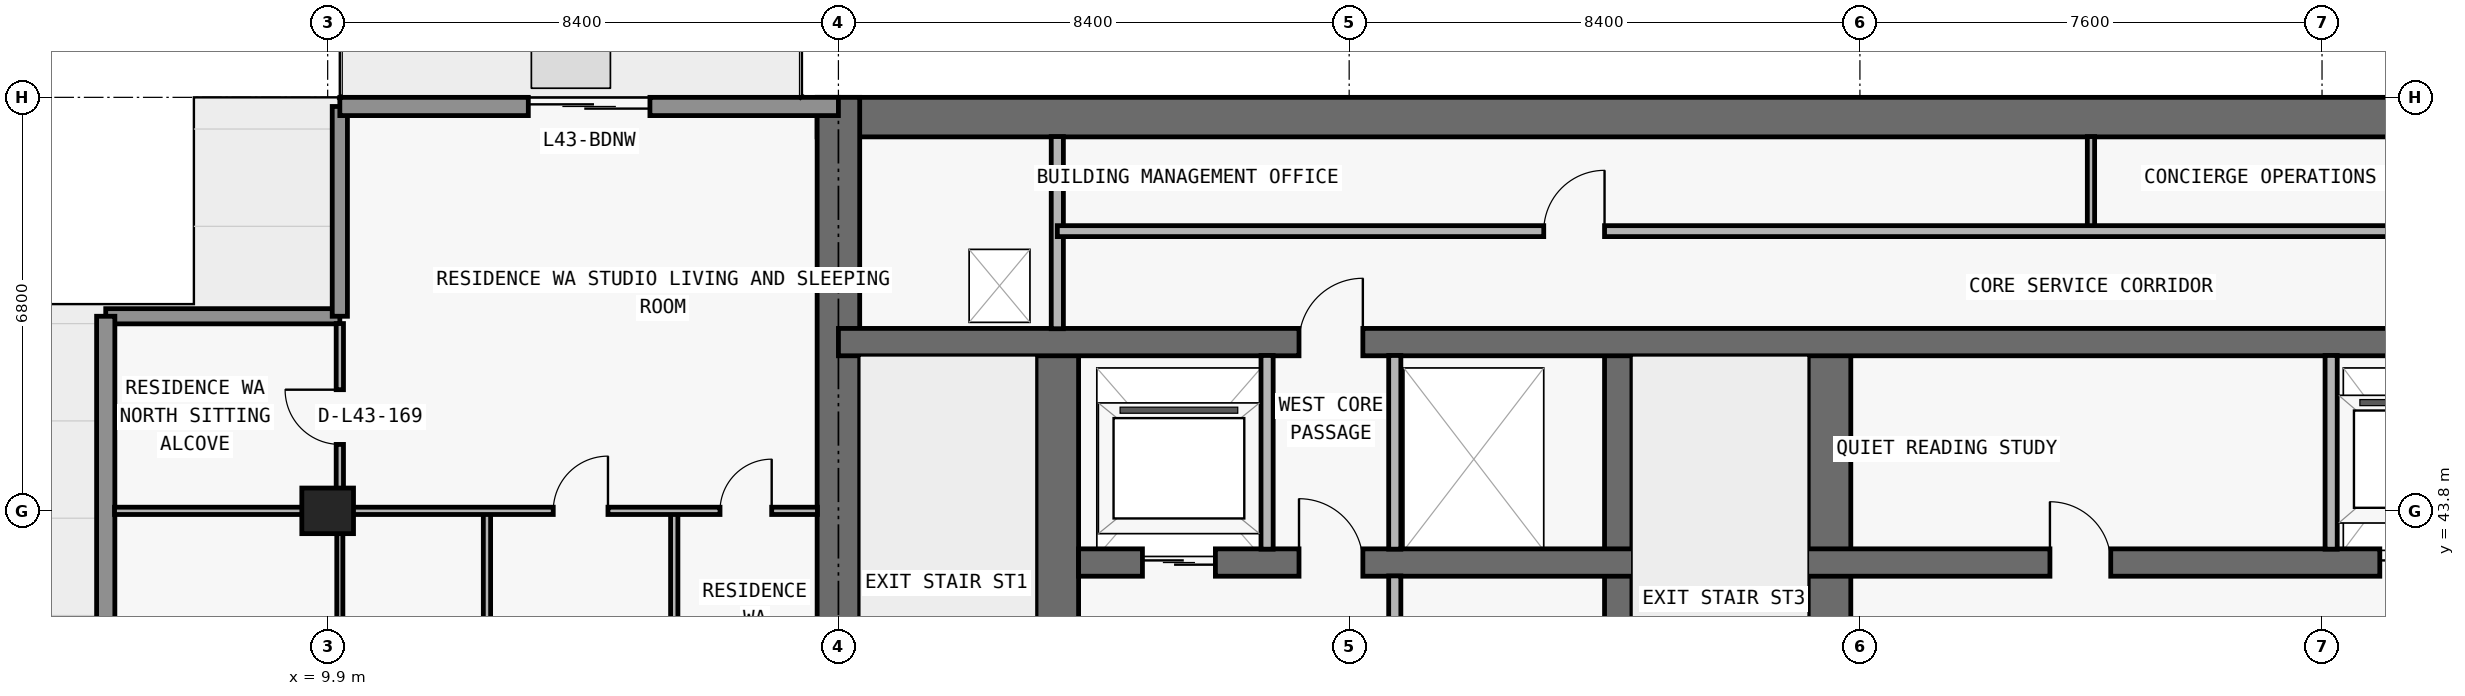
"""IFC4 building model, lengths in metres.
Left out: names, types, materials, properties, quantities, classifications, styles, units other than length and angle.
Written with IfcOpenShell. Run it as: python <this file> out.ifc"""

import sys

from ifc_helpers import new_model, si_unit, direction, frame, frame_2d, origin, origin_2d, place, context, subcontext, project, spatial, rectangle, extrude, element, fill, save


model = new_model("IFC4")
c1 = context("Model", 3, precision=1e-05, world=origin(), true_north=direction((0.0, 1.0)))
c2 = subcontext(c1, "Body", "Model", "MODEL_VIEW")
j1 = project(units=[si_unit("LENGTHUNIT", "METRE"), si_unit("PLANEANGLEUNIT", "RADIAN")], contexts=[c1])
p1 = place(None, origin())
s1 = spatial("IfcSite", under=j1, at=p1, CompositionType="ELEMENT")
p2 = place(p1, origin())
s2 = spatial("IfcBuilding", under=s1, at=p2, CompositionType="ELEMENT")
p3 = place(p2, frame((0.0, 0.0, 157.2)))
s3 = spatial("IfcBuildingStorey", under=s2, at=p3, CompositionType="ELEMENT", Elevation=157.2)
p4 = place(p3, frame((9.9, 43.8, 0.0), z_axis=(0.0, 0.0, 1.0), x_axis=(1.0, 0.0, 0.0)))
e1 = element("IfcColumn", 1, at=p4, inside=s3, PredefinedType="COLUMN", context=c2, shape_type="SweptSolid", body=[
    extrude(rectangle(XDim=0.85, YDim=0.75, at=origin_2d()), origin(), (0.0, 0.0, 1.0), 3.05),
])
p5 = place(p3, frame((17.95, 50.275, 0.0), z_axis=(0.0, 0.0, 1.0), x_axis=(1.0, 0.0, 0.0)))
e2 = element("IfcWall", 2, at=p5, inside=s3, PredefinedType="SHEAR", context=c2, shape_type="SweptSolid", body=[
    extrude(rectangle(XDim=41.9, YDim=0.65, at=frame_2d((20.95, 0.0))), origin(), (0.0, 0.0, 1.0), 3.05),
])
p6 = place(p3, frame((18.3, 36.65, 0.0), z_axis=(0.0, 0.0, 1.0), x_axis=(0.0, 1.0, 0.0)))
e3 = element("IfcWall", 3, at=p6, inside=s3, PredefinedType="SHEAR", context=c2, shape_type="SweptSolid", body=[
    extrude(rectangle(XDim=13.95, YDim=0.7, at=frame_2d((6.975, 0.0))), origin(), (0.0, 0.0, 1.0), 3.05),
])
p7 = place(p3, frame((21.9, 37.0, 0.0), z_axis=(0.0, 0.0, 1.0), x_axis=(0.0, 1.0, 0.0)))
e4 = element("IfcWall", 4, at=p7, inside=s3, PredefinedType="SHEAR", context=c2, shape_type="SweptSolid", body=[
    extrude(rectangle(XDim=9.575, YDim=0.7, at=frame_2d((4.788, 0.0))), origin(), (0.0, 0.0, 1.0), 3.05),
])
p8 = place(p7, frame((0.55, 0.0, 0.0)))
e5 = element("IfcOpeningElement", 5, at=p8, cuts=e4, PredefinedType="OPENING", context=c2, shape_type="SweptSolid", body=[
    extrude(rectangle(XDim=1.1, YDim=2.15, at=frame_2d((0.55, 1.075))), frame((0.0, 0.36, 0.0), z_axis=(0.0, -1.0, 0.0), x_axis=(1.0, 0.0, 0.0)), (0.0, 0.0, 1.0), 0.72),
])
p9 = place(p3, frame((31.125, 37.0, 0.0), z_axis=(0.0, 0.0, 1.0), x_axis=(0.0, 1.0, 0.0)))
e6 = element("IfcWall", 6, at=p9, inside=s3, PredefinedType="SHEAR", context=c2, shape_type="SweptSolid", body=[
    extrude(rectangle(XDim=9.575, YDim=0.45, at=frame_2d((4.788, 0.0))), origin(), (0.0, 0.0, 1.0), 3.05),
])
p10 = place(p3, frame((34.6, 37.0, 0.0), z_axis=(0.0, 0.0, 1.0), x_axis=(0.0, 1.0, 0.0)))
e7 = element("IfcWall", 7, at=p10, inside=s3, PredefinedType="SHEAR", context=c2, shape_type="SweptSolid", body=[
    extrude(rectangle(XDim=9.575, YDim=0.7, at=frame_2d((4.788, 0.0))), origin(), (0.0, 0.0, 1.0), 3.05),
])
p11 = place(p3, frame((22.25, 42.95, 0.0), z_axis=(0.0, 0.0, 1.0), x_axis=(1.0, 0.0, 0.0)))
e8 = element("IfcWall", 8, at=p11, inside=s3, PredefinedType="SHEAR", context=c2, shape_type="SweptSolid", body=[
    extrude(rectangle(XDim=33.3, YDim=0.45, at=frame_2d((16.65, 0.0))), origin(), (0.0, 0.0, 1.0), 3.05),
])
p12 = place(p11, frame((1.05, 0.0, 0.0)))
e9 = element("IfcOpeningElement", 9, at=p12, cuts=e8, PredefinedType="OPENING", context=c2, shape_type="SweptSolid", body=[
    extrude(rectangle(XDim=1.2, YDim=2.2, at=frame_2d((0.6, 1.1))), frame((0.0, 0.235, 0.0), z_axis=(0.0, -1.0, 0.0), x_axis=(1.0, 0.0, 0.0)), (0.0, 0.0, 1.0), 0.47),
])
p13 = place(p11, frame((31.05, 0.0, 0.0)))
e10 = element("IfcOpeningElement", 10, at=p13, cuts=e8, PredefinedType="OPENING", context=c2, shape_type="SweptSolid", body=[
    extrude(rectangle(XDim=1.2, YDim=2.2, at=frame_2d((0.6, 1.1))), frame((0.0, 0.235, 0.0), z_axis=(0.0, -1.0, 0.0), x_axis=(1.0, 0.0, 0.0)), (0.0, 0.0, 1.0), 0.47),
])
p14 = place(p11, frame((21.4, 0.0, 0.0)))
e11 = element("IfcOpeningElement", 11, at=p14, cuts=e8, PredefinedType="OPENING", context=c2, shape_type="SweptSolid", body=[
    extrude(rectangle(XDim=1.1, YDim=2.2, at=frame_2d((0.55, 1.1))), frame((0.0, 0.235, 0.0), z_axis=(0.0, -1.0, 0.0), x_axis=(1.0, 0.0, 0.0)), (0.0, 0.0, 1.0), 0.47),
])
p15 = place(p11, frame((24.0, 0.0, 0.0)))
e12 = element("IfcOpeningElement", 12, at=p15, cuts=e8, PredefinedType="OPENING", context=c2, shape_type="SweptSolid", body=[
    extrude(rectangle(XDim=1.1, YDim=2.2, at=frame_2d((0.55, 1.1))), frame((0.0, 0.235, 0.0), z_axis=(0.0, -1.0, 0.0), x_axis=(1.0, 0.0, 0.0)), (0.0, 0.0, 1.0), 0.47),
])
p16 = place(p11, frame((3.625, 0.0, 0.0)))
e13 = element("IfcOpeningElement", 13, at=p16, cuts=e8, PredefinedType="OPENING", context=c2, shape_type="SweptSolid", body=[
    extrude(rectangle(XDim=1.05, YDim=2.15, at=frame_2d((0.525, 1.075))), frame((0.0, 0.235, 0.0), z_axis=(0.0, -1.0, 0.0), x_axis=(1.0, 0.0, 0.0)), (0.0, 0.0, 1.0), 0.47),
])
p17 = place(p11, frame((28.675, 0.0, 0.0)))
e14 = element("IfcOpeningElement", 14, at=p17, cuts=e8, PredefinedType="OPENING", context=c2, shape_type="SweptSolid", body=[
    extrude(rectangle(XDim=1.05, YDim=2.15, at=frame_2d((0.525, 1.075))), frame((0.0, 0.235, 0.0), z_axis=(0.0, -1.0, 0.0), x_axis=(1.0, 0.0, 0.0)), (0.0, 0.0, 1.0), 0.47),
])
p18 = place(p11, frame((15.975, 0.0, 0.0)))
e15 = element("IfcOpeningElement", 15, at=p18, cuts=e8, PredefinedType="OPENING", context=c2, shape_type="SweptSolid", body=[
    extrude(rectangle(XDim=1.0, YDim=2.2, at=frame_2d((0.5, 1.1))), frame((0.0, 0.235, 0.0), z_axis=(0.0, -1.0, 0.0), x_axis=(1.0, 0.0, 0.0)), (0.0, 0.0, 1.0), 0.47),
])
p19 = place(p3, frame((18.3, 46.575, 0.0), z_axis=(0.0, 0.0, 1.0), x_axis=(1.0, 0.0, 0.0)))
e16 = element("IfcWall", 16, at=p19, inside=s3, PredefinedType="SHEAR", context=c2, shape_type="SweptSolid", body=[
    extrude(rectangle(XDim=41.2, YDim=0.45, at=frame_2d((20.6, 0.0))), origin(), (0.0, 0.0, 1.0), 3.05),
])
p20 = place(p19, frame((7.575, 0.0, 0.0)))
e17 = element("IfcOpeningElement", 17, at=p20, cuts=e16, PredefinedType="OPENING", context=c2, shape_type="SweptSolid", body=[
    extrude(rectangle(XDim=1.05, YDim=2.15, at=frame_2d((0.525, 1.075))), frame((0.0, 0.235, 0.0), z_axis=(0.0, -1.0, 0.0), x_axis=(1.0, 0.0, 0.0)), (0.0, 0.0, 1.0), 0.47),
])
p21 = place(p19, frame((32.625, 0.0, 0.0)))
e18 = element("IfcOpeningElement", 18, at=p21, cuts=e16, PredefinedType="OPENING", context=c2, shape_type="SweptSolid", body=[
    extrude(rectangle(XDim=1.05, YDim=2.15, at=frame_2d((0.525, 1.075))), frame((0.0, 0.235, 0.0), z_axis=(0.0, -1.0, 0.0), x_axis=(1.0, 0.0, 0.0)), (0.0, 0.0, 1.0), 0.47),
])
p22 = place(p3, frame((6.25, 47.0, 0.0), z_axis=(0.0, 0.0, 1.0), x_axis=(1.0, 0.0, 0.0)))
e19 = element("IfcWall", 19, at=p22, inside=s3, PredefinedType="ELEMENTEDWALL", context=c2, shape_type="SweptSolid", body=[
    extrude(rectangle(XDim=3.85, YDim=0.25, at=frame_2d((1.925, 0.0))), origin(), (0.0, 0.0, 1.0), 3.05),
])
p23 = place(p3, frame((10.1, 47.0, 0.0), z_axis=(0.0, 0.0, 1.0), x_axis=(0.0, 1.0, 0.0)))
e20 = element("IfcWall", 20, at=p23, inside=s3, PredefinedType="ELEMENTEDWALL", context=c2, shape_type="SweptSolid", body=[
    extrude(rectangle(XDim=3.45, YDim=0.25, at=frame_2d((1.725, 0.0))), origin(), (0.0, 0.0, 1.0), 3.05),
])
p24 = place(p3, frame((6.25, 29.1, 0.0), z_axis=(0.0, 0.0, 1.0), x_axis=(0.0, 1.0, 0.0)))
e21 = element("IfcWall", 21, at=p24, inside=s3, PredefinedType="STANDARD", context=c2, shape_type="SweptSolid", body=[
    extrude(rectangle(XDim=17.9, YDim=0.3, at=frame_2d((8.95, 0.0))), origin(), (0.0, 0.0, 1.0), 3.05),
])
p25 = place(p3, frame((10.1, 50.45, 0.0), z_axis=(0.0, 0.0, 1.0), x_axis=(1.0, 0.0, 0.0)))
e22 = element("IfcWall", 22, at=p25, inside=s3, PredefinedType="STANDARD", context=c2, shape_type="SweptSolid", body=[
    extrude(rectangle(XDim=8.2, YDim=0.3, at=frame_2d((4.1, 0.0))), origin(), (0.0, 0.0, 1.0), 3.05),
])
p26 = place(p25, frame((3.1, 0.0, 0.0)))
e23 = element("IfcOpeningElement", 23, at=p26, cuts=e22, PredefinedType="OPENING", context=c2, shape_type="SweptSolid", body=[
    extrude(rectangle(XDim=2.0, YDim=2.3, at=frame_2d((1.0, 1.15))), frame((0.0, 0.16, 0.0), z_axis=(0.0, -1.0, 0.0), x_axis=(1.0, 0.0, 0.0)), (0.0, 0.0, 1.0), 0.32),
])
p27 = place(p3, frame((10.1, 37.0, 0.0), z_axis=(0.0, 0.0, 1.0), x_axis=(0.0, 1.0, 0.0)))
e24 = element("IfcWall", 24, at=p27, inside=s3, PredefinedType="MOVABLE", context=c2, shape_type="SweptSolid", body=[
    extrude(rectangle(XDim=6.8, YDim=0.1, at=frame_2d((3.4, 0.0))), origin(), (0.0, 0.0, 1.0), 2.263),
])
p28 = place(p27, frame((2.95, 0.0, 0.0)))
e25 = element("IfcOpeningElement", 25, at=p28, cuts=e24, PredefinedType="OPENING", context=c2, shape_type="SweptSolid", body=[
    extrude(rectangle(XDim=0.9, YDim=2.15, at=frame_2d((0.45, 1.075))), frame((0.0, 0.06, 0.0), z_axis=(0.0, -1.0, 0.0), x_axis=(1.0, 0.0, 0.0)), (0.0, 0.0, 1.0), 0.12),
])
p29 = place(p3, frame((10.1, 43.805, 0.0), z_axis=(0.0, 0.0, 1.0), x_axis=(0.0, 1.0, 0.0)))
e26 = element("IfcWall", 26, at=p29, inside=s3, PredefinedType="PARTITIONING", context=c2, shape_type="SweptSolid", body=[
    extrude(rectangle(XDim=3.075, YDim=0.12, at=frame_2d((1.538, 0.0))), origin(), (0.0, 0.0, 1.0), 3.05),
])
p30 = place(p29, frame((1.087, 0.0, 0.0)))
e27 = element("IfcOpeningElement", 27, at=p30, cuts=e26, PredefinedType="OPENING", context=c2, shape_type="SweptSolid", body=[
    extrude(rectangle(XDim=0.9, YDim=2.15, at=frame_2d((0.45, 1.075))), frame((0.0, 0.07, 0.0), z_axis=(0.0, -1.0, 0.0), x_axis=(1.0, 0.0, 0.0)), (0.0, 0.0, 1.0), 0.14),
])
p31 = place(p3, frame((12.52, 37.0, 0.0), z_axis=(0.0, 0.0, 1.0), x_axis=(0.0, 1.0, 0.0)))
e28 = element("IfcWall", 28, at=p31, inside=s3, PredefinedType="PARTITIONING", context=c2, shape_type="SweptSolid", body=[
    extrude(rectangle(XDim=6.8, YDim=0.12, at=frame_2d((3.4, 0.0))), origin(), (0.0, 0.0, 1.0), 3.05),
])
p32 = place(p31, frame((2.95, 0.0, 0.0)))
e29 = element("IfcOpeningElement", 29, at=p32, cuts=e28, PredefinedType="OPENING", context=c2, shape_type="SweptSolid", body=[
    extrude(rectangle(XDim=0.9, YDim=2.15, at=frame_2d((0.45, 1.075))), frame((0.0, 0.07, 0.0), z_axis=(0.0, -1.0, 0.0), x_axis=(1.0, 0.0, 0.0)), (0.0, 0.0, 1.0), 0.14),
])
p33 = place(p3, frame((15.6, 37.0, 0.0), z_axis=(0.0, 0.0, 1.0), x_axis=(0.0, 1.0, 0.0)))
e30 = element("IfcWall", 30, at=p33, inside=s3, PredefinedType="PARTITIONING", context=c2, shape_type="SweptSolid", body=[
    extrude(rectangle(XDim=6.8, YDim=0.12, at=frame_2d((3.4, 0.0))), origin(), (0.0, 0.0, 1.0), 3.05),
])
p34 = place(p33, frame((1.194, 0.0, 0.0)))
e31 = element("IfcOpeningElement", 31, at=p34, cuts=e30, PredefinedType="OPENING", context=c2, shape_type="SweptSolid", body=[
    extrude(rectangle(XDim=0.85, YDim=2.1, at=frame_2d((0.425, 1.05))), frame((0.0, 0.07, 0.0), z_axis=(0.0, -1.0, 0.0), x_axis=(1.0, 0.0, 0.0)), (0.0, 0.0, 1.0), 0.14),
])
p35 = place(p3, frame((21.9, 46.795, 0.0), z_axis=(0.0, 0.0, 1.0), x_axis=(0.0, 1.0, 0.0)))
e32 = element("IfcWall", 32, at=p35, inside=s3, PredefinedType="PARTITIONING", context=c2, shape_type="SweptSolid", body=[
    extrude(rectangle(XDim=3.16, YDim=0.2, at=frame_2d((1.58, 0.0))), origin(), (0.0, 0.0, 1.0), 3.05),
])
p36 = place(p3, frame((25.35, 43.17, 0.0), z_axis=(0.0, 0.0, 1.0), x_axis=(0.0, 1.0, 0.0)))
e33 = element("IfcWall", 33, at=p36, inside=s3, PredefinedType="PARTITIONING", context=c2, shape_type="SweptSolid", body=[
    extrude(rectangle(XDim=3.185, YDim=0.2, at=frame_2d((1.593, 0.0))), origin(), (0.0, 0.0, 1.0), 3.05),
])
p37 = place(p3, frame((27.45, 37.345, 0.0), z_axis=(0.0, 0.0, 1.0), x_axis=(0.0, 1.0, 0.0)))
e34 = element("IfcWall", 34, at=p37, inside=s3, PredefinedType="PARTITIONING", context=c2, shape_type="SweptSolid", body=[
    extrude(rectangle(XDim=5.385, YDim=0.2, at=frame_2d((2.692, 0.0))), origin(), (0.0, 0.0, 1.0), 3.05),
])
p38 = place(p3, frame((27.45, 43.17, 0.0), z_axis=(0.0, 0.0, 1.0), x_axis=(0.0, 1.0, 0.0)))
e35 = element("IfcWall", 35, at=p38, inside=s3, PredefinedType="PARTITIONING", context=c2, shape_type="SweptSolid", body=[
    extrude(rectangle(XDim=3.185, YDim=0.2, at=frame_2d((1.593, 0.0))), origin(), (0.0, 0.0, 1.0), 3.05),
])
p39 = place(p3, frame((38.9, 48.4, 0.0), z_axis=(0.0, 0.0, 1.0), x_axis=(0.0, 1.0, 0.0)))
e36 = element("IfcWall", 36, at=p39, inside=s3, PredefinedType="PARTITIONING", context=c2, shape_type="SweptSolid", body=[
    extrude(rectangle(XDim=1.555, YDim=0.12, at=frame_2d((0.778, 0.0))), origin(), (0.0, 0.0, 1.0), 3.05),
])
p40 = place(p3, frame((42.85, 43.17, 0.0), z_axis=(0.0, 0.0, 1.0), x_axis=(0.0, 1.0, 0.0)))
e37 = element("IfcWall", 37, at=p40, inside=s3, PredefinedType="PARTITIONING", context=c2, shape_type="SweptSolid", body=[
    extrude(rectangle(XDim=3.185, YDim=0.2, at=frame_2d((1.593, 0.0))), origin(), (0.0, 0.0, 1.0), 3.05),
])
p41 = place(p3, frame((6.395, 43.8, 0.0), z_axis=(0.0, 0.0, 1.0), x_axis=(1.0, 0.0, 0.0)))
e38 = element("IfcWall", 38, at=p41, inside=s3, PredefinedType="PARTITIONING", context=c2, shape_type="SweptSolid", body=[
    extrude(rectangle(XDim=11.56, YDim=0.12, at=frame_2d((5.78, 0.0))), origin(), (0.0, 0.0, 1.0), 2.418),
])
p42 = place(p41, frame((7.215, 0.0, 0.0)))
e39 = element("IfcOpeningElement", 39, at=p42, cuts=e38, PredefinedType="OPENING", context=c2, shape_type="SweptSolid", body=[
    extrude(rectangle(XDim=0.9, YDim=2.15, at=frame_2d((0.45, 1.075))), frame((0.0, 0.07, 0.0), z_axis=(0.0, -1.0, 0.0), x_axis=(1.0, 0.0, 0.0)), (0.0, 0.0, 1.0), 0.14),
])
p43 = place(p41, frame((9.958, 0.0, 0.0)))
e40 = element("IfcOpeningElement", 40, at=p43, cuts=e38, PredefinedType="OPENING", context=c2, shape_type="SweptSolid", body=[
    extrude(rectangle(XDim=0.85, YDim=2.1, at=frame_2d((0.425, 1.05))), frame((0.0, 0.07, 0.0), z_axis=(0.0, -1.0, 0.0), x_axis=(1.0, 0.0, 0.0)), (0.0, 0.0, 1.0), 0.14),
])
p44 = place(p3, frame((21.9, 48.4, 0.0), z_axis=(0.0, 0.0, 1.0), x_axis=(1.0, 0.0, 0.0)))
e41 = element("IfcWall", 41, at=p44, inside=s3, PredefinedType="PARTITIONING", context=c2, shape_type="SweptSolid", body=[
    extrude(rectangle(XDim=33.986, YDim=0.18, at=frame_2d((16.993, 0.0))), origin(), (0.0, 0.0, 1.0), 3.05),
])
p45 = place(p44, frame((8.0, 0.0, 0.0)))
e42 = element("IfcOpeningElement", 42, at=p45, cuts=e41, PredefinedType="OPENING", context=c2, shape_type="SweptSolid", body=[
    extrude(rectangle(XDim=1.0, YDim=2.2, at=frame_2d((0.5, 1.1))), frame((0.0, 0.1, 0.0), z_axis=(0.0, -1.0, 0.0), x_axis=(1.0, 0.0, 0.0)), (0.0, 0.0, 1.0), 0.2),
])
p46 = place(p44, frame((24.993, 0.0, 0.0)))
e43 = element("IfcOpeningElement", 43, at=p46, cuts=e41, PredefinedType="OPENING", context=c2, shape_type="SweptSolid", body=[
    extrude(rectangle(XDim=1.0, YDim=2.2, at=frame_2d((0.5, 1.1))), frame((0.0, 0.1, 0.0), z_axis=(0.0, -1.0, 0.0), x_axis=(1.0, 0.0, 0.0)), (0.0, 0.0, 1.0), 0.2),
])
p47 = place(p26, origin())
e44 = element("IfcDoor", 44, at=p47, inside=s3, OperationType="DOUBLE_DOOR_SLIDING", PredefinedType="DOOR", context=c2, shape_type="SweptSolid", body=[
    extrude(rectangle(XDim=2.0, YDim=2.3, at=frame_2d((1.0, 1.15))), frame((0.0, 0.025, 0.0), z_axis=(0.0, -1.0, 0.0), x_axis=(1.0, 0.0, 0.0)), (0.0, 0.0, 1.0), 0.05),
])
fill(e23, e44)
p48 = place(p12, origin())
e45 = element("IfcDoor", 45, at=p48, inside=s3, OperationType="DOUBLE_DOOR_SLIDING", PredefinedType="DOOR", context=c2, shape_type="SweptSolid", body=[
    extrude(rectangle(XDim=1.2, YDim=2.2, at=frame_2d((0.6, 1.1))), frame((0.0, 0.025, 0.0), z_axis=(0.0, -1.0, 0.0), x_axis=(1.0, 0.0, 0.0)), (0.0, 0.0, 1.0), 0.05),
])
fill(e9, e45)
p49 = place(p14, origin())
e46 = element("IfcDoor", 46, at=p49, inside=s3, OperationType="DOUBLE_DOOR_SLIDING", PredefinedType="DOOR", context=c2, shape_type="SweptSolid", body=[
    extrude(rectangle(XDim=1.1, YDim=2.2, at=frame_2d((0.55, 1.1))), frame((0.0, 0.025, 0.0), z_axis=(0.0, -1.0, 0.0), x_axis=(1.0, 0.0, 0.0)), (0.0, 0.0, 1.0), 0.05),
])
fill(e11, e46)
p50 = place(p16, origin())
e47 = element("IfcDoor", 47, at=p50, inside=s3, OperationType="SINGLE_SWING_LEFT", PredefinedType="DOOR", context=c2, shape_type="SweptSolid", body=[
    extrude(rectangle(XDim=1.05, YDim=2.15, at=frame_2d((0.525, 1.075))), frame((0.0, 0.025, 0.0), z_axis=(0.0, -1.0, 0.0), x_axis=(1.0, 0.0, 0.0)), (0.0, 0.0, 1.0), 0.05),
])
fill(e13, e47)
p51 = place(p18, origin())
e48 = element("IfcDoor", 48, at=p51, inside=s3, OperationType="SINGLE_SWING_LEFT", PredefinedType="DOOR", context=c2, shape_type="SweptSolid", body=[
    extrude(rectangle(XDim=1.0, YDim=2.2, at=frame_2d((0.5, 1.1))), frame((0.0, 0.025, 0.0), z_axis=(0.0, -1.0, 0.0), x_axis=(1.0, 0.0, 0.0)), (0.0, 0.0, 1.0), 0.05),
])
fill(e15, e48)
p52 = place(p20, origin())
e49 = element("IfcDoor", 49, at=p52, inside=s3, OperationType="SINGLE_SWING_RIGHT", PredefinedType="DOOR", context=c2, shape_type="SweptSolid", body=[
    extrude(rectangle(XDim=1.05, YDim=2.15, at=frame_2d((0.525, 1.075))), frame((0.0, 0.025, 0.0), z_axis=(0.0, -1.0, 0.0), x_axis=(1.0, 0.0, 0.0)), (0.0, 0.0, 1.0), 0.05),
])
fill(e17, e49)
p53 = place(p45, origin())
e50 = element("IfcDoor", 50, at=p53, inside=s3, OperationType="SINGLE_SWING_RIGHT", PredefinedType="DOOR", context=c2, shape_type="SweptSolid", body=[
    extrude(rectangle(XDim=1.0, YDim=2.2, at=frame_2d((0.5, 1.1))), frame((0.0, 0.025, 0.0), z_axis=(0.0, -1.0, 0.0), x_axis=(1.0, 0.0, 0.0)), (0.0, 0.0, 1.0), 0.05),
])
fill(e42, e50)
p54 = place(p42, origin())
e51 = element("IfcDoor", 51, at=p54, inside=s3, OperationType="SINGLE_SWING_RIGHT", PredefinedType="DOOR", context=c2, shape_type="SweptSolid", body=[
    extrude(rectangle(XDim=0.9, YDim=2.15, at=frame_2d((0.45, 1.075))), frame((0.0, 0.025, 0.0), z_axis=(0.0, -1.0, 0.0), x_axis=(1.0, 0.0, 0.0)), (0.0, 0.0, 1.0), 0.05),
])
fill(e39, e51)
p55 = place(p43, origin())
e52 = element("IfcDoor", 52, at=p55, inside=s3, OperationType="SINGLE_SWING_RIGHT", PredefinedType="DOOR", context=c2, shape_type="SweptSolid", body=[
    extrude(rectangle(XDim=0.85, YDim=2.1, at=frame_2d((0.425, 1.05))), frame((0.0, 0.025, 0.0), z_axis=(0.0, -1.0, 0.0), x_axis=(1.0, 0.0, 0.0)), (0.0, 0.0, 1.0), 0.05),
])
fill(e40, e52)
p56 = place(p30, origin())
e53 = element("IfcDoor", 53, at=p56, inside=s3, OperationType="SINGLE_SWING_RIGHT", PredefinedType="DOOR", context=c2, shape_type="SweptSolid", body=[
    extrude(rectangle(XDim=0.9, YDim=2.15, at=frame_2d((0.45, 1.075))), frame((0.0, 0.025, 0.0), z_axis=(0.0, -1.0, 0.0), x_axis=(1.0, 0.0, 0.0)), (0.0, 0.0, 1.0), 0.05),
])
fill(e27, e53)
save(model, sys.argv[1])
